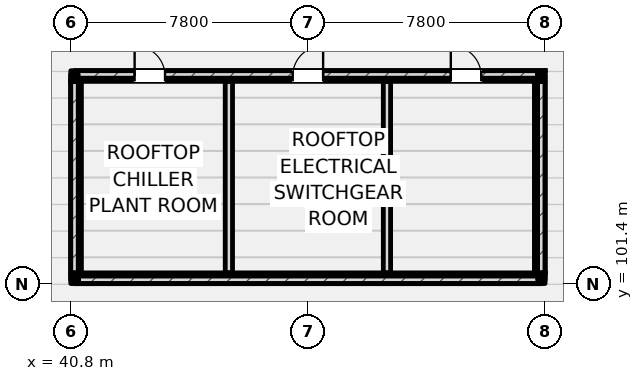
"""IFC4 building model, lengths in metres.
Left out: names, types, materials, properties, quantities, classifications, styles, units other than length and angle.
Written with IfcOpenShell. Run it as: python <this file> out.ifc"""

import sys

from ifc_helpers import new_model, si_unit, direction, frame, frame_2d, origin, place, context, subcontext, project, spatial, rectangle, extrude, element, fill, save


model = new_model("IFC4")
c1 = context("Model", 3, precision=1e-05, world=origin(), true_north=direction((0.0, 1.0)))
c2 = subcontext(c1, "Body", "Model", "MODEL_VIEW")
j1 = project(units=[si_unit("LENGTHUNIT", "METRE"), si_unit("PLANEANGLEUNIT", "RADIAN")], contexts=[c1])
p1 = place(None, origin())
s1 = spatial("IfcSite", under=j1, at=p1, CompositionType="ELEMENT")
p2 = place(p1, origin())
s2 = spatial("IfcBuilding", under=s1, at=p2, CompositionType="ELEMENT")
p3 = place(p2, frame((0.0, 0.0, 51.6)))
s3 = spatial("IfcBuildingStorey", under=s2, at=p3, CompositionType="ELEMENT", Elevation=51.6)
p4 = place(p3, frame((40.8, 108.225, 0.0), z_axis=(0.0, 0.0, 1.0), x_axis=(1.0, 0.0, 0.0)))
e1 = element("IfcWall", 1, at=p4, inside=s3, PredefinedType="SHEAR", context=c2, shape_type="SweptSolid", body=[
    extrude(rectangle(XDim=15.6, YDim=0.35, at=frame_2d((7.8, 0.0))), origin(), (0.0, 0.0, 1.0), 2.6),
])
p5 = place(p4, frame((2.1, 0.0, 0.0)))
e2 = element("IfcOpeningElement", 2, at=p5, cuts=e1, PredefinedType="OPENING", context=c2, shape_type="SweptSolid", body=[
    extrude(rectangle(XDim=1.0, YDim=2.15, at=frame_2d((0.5, 1.075))), frame((0.0, 0.185, 0.0), z_axis=(0.0, -1.0, 0.0), x_axis=(1.0, 0.0, 0.0)), (0.0, 0.0, 1.0), 0.37),
])
p6 = place(p4, frame((7.3, 0.0, 0.0)))
e3 = element("IfcOpeningElement", 3, at=p6, cuts=e1, PredefinedType="OPENING", context=c2, shape_type="SweptSolid", body=[
    extrude(rectangle(XDim=1.0, YDim=2.15, at=frame_2d((0.5, 1.075))), frame((0.0, 0.185, 0.0), z_axis=(0.0, -1.0, 0.0), x_axis=(1.0, 0.0, 0.0)), (0.0, 0.0, 1.0), 0.37),
])
p7 = place(p4, frame((12.5, 0.0, 0.0)))
e4 = element("IfcOpeningElement", 4, at=p7, cuts=e1, PredefinedType="OPENING", context=c2, shape_type="SweptSolid", body=[
    extrude(rectangle(XDim=1.0, YDim=2.15, at=frame_2d((0.5, 1.075))), frame((0.0, 0.185, 0.0), z_axis=(0.0, -1.0, 0.0), x_axis=(1.0, 0.0, 0.0)), (0.0, 0.0, 1.0), 0.37),
])
p8 = place(p3, frame((40.8, 101.575, 0.0), z_axis=(0.0, 0.0, 1.0), x_axis=(1.0, 0.0, 0.0)))
e5 = element("IfcWall", 5, at=p8, inside=s3, PredefinedType="SHEAR", context=c2, shape_type="SweptSolid", body=[
    extrude(rectangle(XDim=15.6, YDim=0.35, at=frame_2d((7.8, 0.0))), origin(), (0.0, 0.0, 1.0), 2.6),
])
for number, where, z_axis, x_axis in (
    (6, (40.975, 101.75, 0.0), (0.0, 0.0, 1.0), (0.0, 1.0, 0.0)),
    (7, (56.225, 101.75, 0.0), (0.0, 0.0, 1.0), (0.0, 1.0, 0.0)),
):
    element("IfcWall", number, at=place(p3, frame(where, z_axis=z_axis, x_axis=x_axis)), inside=s3, PredefinedType="SHEAR", context=c2, shape_type="SweptSolid", body=[
        extrude(rectangle(XDim=6.3, YDim=0.35, at=frame_2d((3.15, 0.0))), origin(), (0.0, 0.0, 1.0), 2.6),
    ])
for number, where, z_axis, x_axis in (
    (8, (46.0, 101.75, 0.0), (0.0, 0.0, 1.0), (0.0, 1.0, 0.0)),
    (9, (51.2, 101.75, 0.0), (0.0, 0.0, 1.0), (0.0, 1.0, 0.0)),
):
    element("IfcWall", number, at=place(p3, frame(where, z_axis=z_axis, x_axis=x_axis)), inside=s3, PredefinedType="STANDARD", context=c2, shape_type="SweptSolid", body=[
        extrude(rectangle(XDim=6.3, YDim=0.24, at=frame_2d((3.15, 0.0))), origin(), (0.0, 0.0, 1.0), 2.6),
    ])
p9 = place(p3, frame((40.92, 101.52, 2.86), z_axis=(0.0, 0.0, 1.0), x_axis=(1.0, 0.0, 0.0)))
e10 = element("IfcWall", 10, at=p9, inside=s3, PredefinedType="PARAPET", context=c2, shape_type="SweptSolid", body=[
    extrude(rectangle(XDim=15.36, YDim=0.25, at=frame_2d((7.68, 0.0))), origin(), (0.0, 0.0, 1.0), 1.12),
])
p10 = place(p3, frame((56.28, 101.52, 2.86), z_axis=(0.0, 0.0, 1.0), x_axis=(0.0, 1.0, 0.0)))
e11 = element("IfcWall", 11, at=p10, inside=s3, PredefinedType="PARAPET", context=c2, shape_type="SweptSolid", body=[
    extrude(rectangle(XDim=6.76, YDim=0.25, at=frame_2d((3.38, 0.0))), origin(), (0.0, 0.0, 1.0), 1.12),
])
p11 = place(p3, frame((56.28, 108.28, 2.86), z_axis=(0.0, 0.0, 1.0), x_axis=(-1.0, 0.0, 0.0)))
e12 = element("IfcWall", 12, at=p11, inside=s3, PredefinedType="PARAPET", context=c2, shape_type="SweptSolid", body=[
    extrude(rectangle(XDim=15.36, YDim=0.25, at=frame_2d((7.68, 0.0))), origin(), (0.0, 0.0, 1.0), 1.12),
])
p12 = place(p3, frame((40.92, 108.28, 2.86), z_axis=(0.0, 0.0, 1.0), x_axis=(0.0, -1.0, 0.0)))
e13 = element("IfcWall", 13, at=p12, inside=s3, PredefinedType="PARAPET", context=c2, shape_type="SweptSolid", body=[
    extrude(rectangle(XDim=6.76, YDim=0.25, at=frame_2d((3.38, 0.0))), origin(), (0.0, 0.0, 1.0), 1.12),
])
p13 = place(p5, origin())
e14 = element("IfcDoor", 14, at=p13, inside=s3, OperationType="SINGLE_SWING_LEFT", PredefinedType="DOOR", context=c2, shape_type="SweptSolid", body=[
    extrude(rectangle(XDim=1.0, YDim=2.15, at=frame_2d((0.5, 1.075))), frame((0.0, 0.025, 0.0), z_axis=(0.0, -1.0, 0.0), x_axis=(1.0, 0.0, 0.0)), (0.0, 0.0, 1.0), 0.05),
])
fill(e2, e14)
p14 = place(p6, origin())
e15 = element("IfcDoor", 15, at=p14, inside=s3, OperationType="SINGLE_SWING_RIGHT", PredefinedType="DOOR", context=c2, shape_type="SweptSolid", body=[
    extrude(rectangle(XDim=1.0, YDim=2.15, at=frame_2d((0.5, 1.075))), frame((0.0, 0.025, 0.0), z_axis=(0.0, -1.0, 0.0), x_axis=(1.0, 0.0, 0.0)), (0.0, 0.0, 1.0), 0.05),
])
fill(e3, e15)
p15 = place(p7, origin())
e16 = element("IfcDoor", 16, at=p15, inside=s3, OperationType="SINGLE_SWING_LEFT", PredefinedType="DOOR", context=c2, shape_type="SweptSolid", body=[
    extrude(rectangle(XDim=1.0, YDim=2.15, at=frame_2d((0.5, 1.075))), frame((0.0, 0.025, 0.0), z_axis=(0.0, -1.0, 0.0), x_axis=(1.0, 0.0, 0.0)), (0.0, 0.0, 1.0), 0.05),
])
fill(e4, e16)
save(model, sys.argv[1])
